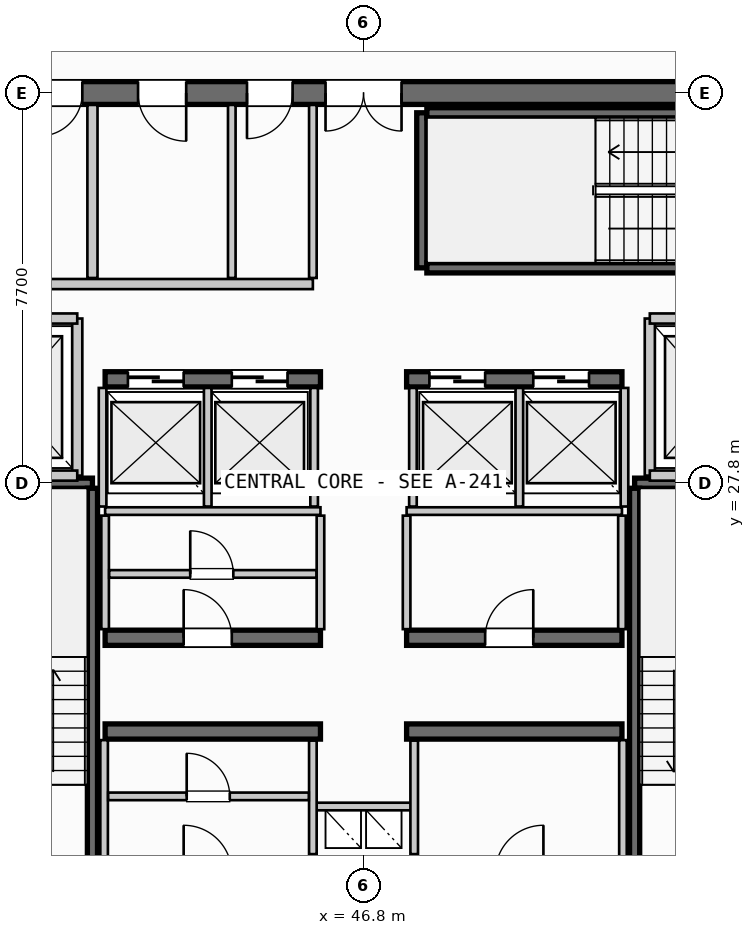
"""IFC4 building model, lengths in metres.
Left out: names, types, materials, properties, quantities, classifications, styles, units other than length and angle.
Written with IfcOpenShell. Run it as: python <this file> out.ifc"""

import sys

from ifc_helpers import new_model, si_unit, direction, frame, frame_2d, origin, place, context, subcontext, project, spatial, rectangle, extrude, source, transform, mapped, element, fill, save


model = new_model("IFC4")
c1 = context("Model", 3, precision=1e-05, world=origin(), true_north=direction((0.0, 1.0)))
c2 = subcontext(c1, "Body", "Model", "MODEL_VIEW")
j1 = project(units=[si_unit("LENGTHUNIT", "METRE"), si_unit("PLANEANGLEUNIT", "RADIAN")], contexts=[c1])
p1 = place(None, origin())
s1 = spatial("IfcSite", under=j1, at=p1, CompositionType="ELEMENT")
p2 = place(p1, origin())
s2 = spatial("IfcBuilding", under=s1, at=p2, CompositionType="ELEMENT")
p3 = place(p2, frame((0.0, 0.0, 297.4)))
s3 = spatial("IfcBuildingStorey", under=s2, at=p3, CompositionType="ELEMENT", Elevation=297.4)
p4 = place(p3, frame((55.6, 35.5, 0.0), z_axis=(0.0, 0.0, 1.0), x_axis=(-1.0, 0.0, 0.0)))
e1 = element("IfcWall", 1, at=p4, inside=s3, PredefinedType="SHEAR", context=c2, shape_type="SweptSolid", body=[
    extrude(rectangle(XDim=17.6, YDim=0.45, at=frame_2d((8.8, 0.0))), origin(), (0.0, 0.0, 1.0), 3.21),
])
p5 = place(p4, frame((8.05, 0.0, 0.0)))
e2 = element("IfcOpeningElement", 2, at=p5, cuts=e1, PredefinedType="OPENING", context=c2, shape_type="SweptSolid", body=[
    extrude(rectangle(XDim=1.5, YDim=2.2, at=frame_2d((0.75, 1.1))), frame((0.0, 0.235, 0.0), z_axis=(0.0, -1.0, 0.0), x_axis=(1.0, 0.0, 0.0)), (0.0, 0.0, 1.0), 0.47),
])
p6 = place(p4, frame((15.85, 0.0, 0.0)))
e3 = element("IfcOpeningElement", 3, at=p6, cuts=e1, PredefinedType="OPENING", context=c2, shape_type="SweptSolid", body=[
    extrude(rectangle(XDim=0.85, YDim=2.15, at=frame_2d((0.425, 1.075))), frame((0.0, 0.235, 0.0), z_axis=(0.0, -1.0, 0.0), x_axis=(1.0, 0.0, 0.0)), (0.0, 0.0, 1.0), 0.47),
])
p7 = place(p4, frame((14.35, 0.0, 0.0)))
e4 = element("IfcOpeningElement", 4, at=p7, cuts=e1, PredefinedType="OPENING", context=c2, shape_type="SweptSolid", body=[
    extrude(rectangle(XDim=0.85, YDim=2.15, at=frame_2d((0.425, 1.075))), frame((0.0, 0.235, 0.0), z_axis=(0.0, -1.0, 0.0), x_axis=(1.0, 0.0, 0.0)), (0.0, 0.0, 1.0), 0.47),
])
p8 = place(p4, frame((12.3, 0.0, 0.0)))
e5 = element("IfcOpeningElement", 5, at=p8, cuts=e1, PredefinedType="OPENING", context=c2, shape_type="SweptSolid", body=[
    extrude(rectangle(XDim=0.95, YDim=2.15, at=frame_2d((0.475, 1.075))), frame((0.0, 0.235, 0.0), z_axis=(0.0, -1.0, 0.0), x_axis=(1.0, 0.0, 0.0)), (0.0, 0.0, 1.0), 0.47),
])
p9 = place(p4, frame((10.2, 0.0, 0.0)))
e6 = element("IfcOpeningElement", 6, at=p9, cuts=e1, PredefinedType="OPENING", context=c2, shape_type="SweptSolid", body=[
    extrude(rectangle(XDim=0.9, YDim=2.15, at=frame_2d((0.45, 1.075))), frame((0.0, 0.235, 0.0), z_axis=(0.0, -1.0, 0.0), x_axis=(1.0, 0.0, 0.0)), (0.0, 0.0, 1.0), 0.47),
])
for number, where, z_axis, x_axis in (
    (7, (41.7, 22.9, 0.0), (0.0, 0.0, 1.0), (1.0, 0.0, 0.0)),
    (8, (47.65, 22.9, 0.0), (0.0, 0.0, 1.0), (1.0, 0.0, 0.0)),
):
    element("IfcWall", number, at=place(p3, frame(where, z_axis=z_axis, x_axis=x_axis)), inside=s3, PredefinedType="SHEAR", context=c2, shape_type="SweptSolid", body=[
        extrude(rectangle(XDim=4.25, YDim=0.3, at=frame_2d((2.125, 0.0))), origin(), (0.0, 0.0, 1.0), 3.21),
    ])
p10 = place(p3, frame((41.7, 24.75, 0.0), z_axis=(0.0, 0.0, 1.0), x_axis=(1.0, 0.0, 0.0)))
e9 = element("IfcWall", 9, at=p10, inside=s3, PredefinedType="SHEAR", context=c2, shape_type="SweptSolid", body=[
    extrude(rectangle(XDim=4.25, YDim=0.3, at=frame_2d((2.125, 0.0))), origin(), (0.0, 0.0, 1.0), 3.21),
])
p11 = place(p10, frame((1.55, 0.0, 0.0)))
e10 = element("IfcOpeningElement", 10, at=p11, cuts=e9, PredefinedType="OPENING", context=c2, shape_type="SweptSolid", body=[
    extrude(rectangle(XDim=0.95, YDim=2.15, at=frame_2d((0.475, 1.075))), frame((0.0, 0.16, 0.0), z_axis=(0.0, -1.0, 0.0), x_axis=(1.0, 0.0, 0.0)), (0.0, 0.0, 1.0), 0.32),
])
p12 = place(p3, frame((47.65, 24.75, 0.0), z_axis=(0.0, 0.0, 1.0), x_axis=(1.0, 0.0, 0.0)))
e11 = element("IfcWall", 11, at=p12, inside=s3, PredefinedType="SHEAR", context=c2, shape_type="SweptSolid", body=[
    extrude(rectangle(XDim=4.25, YDim=0.3, at=frame_2d((2.125, 0.0))), origin(), (0.0, 0.0, 1.0), 3.21),
])
p13 = place(p12, frame((1.55, 0.0, 0.0)))
e12 = element("IfcOpeningElement", 12, at=p13, cuts=e11, PredefinedType="OPENING", context=c2, shape_type="SweptSolid", body=[
    extrude(rectangle(XDim=0.95, YDim=2.15, at=frame_2d((0.475, 1.075))), frame((0.0, 0.16, 0.0), z_axis=(0.0, -1.0, 0.0), x_axis=(1.0, 0.0, 0.0)), (0.0, 0.0, 1.0), 0.32),
])
p14 = place(p3, frame((41.7, 29.85, 0.0), z_axis=(0.0, 0.0, 1.0), x_axis=(1.0, 0.0, 0.0)))
e13 = element("IfcWall", 13, at=p14, inside=s3, PredefinedType="SHEAR", context=c2, shape_type="SweptSolid", body=[
    extrude(rectangle(XDim=4.25, YDim=0.3, at=frame_2d((2.125, 0.0))), origin(), (0.0, 0.0, 1.0), 3.21),
])
p15 = place(p14, frame((0.45, 0.0, 0.0)))
e14 = element("IfcOpeningElement", 14, at=p15, cuts=e13, PredefinedType="OPENING", context=c2, shape_type="SweptSolid", body=[
    extrude(rectangle(XDim=1.1, YDim=2.2, at=frame_2d((0.55, 1.1))), frame((0.0, 0.16, 0.0), z_axis=(0.0, -1.0, 0.0), x_axis=(1.0, 0.0, 0.0)), (0.0, 0.0, 1.0), 0.32),
])
p16 = place(p14, frame((2.5, 0.0, 0.0)))
e15 = element("IfcOpeningElement", 15, at=p16, cuts=e13, PredefinedType="OPENING", context=c2, shape_type="SweptSolid", body=[
    extrude(rectangle(XDim=1.1, YDim=2.2, at=frame_2d((0.55, 1.1))), frame((0.0, 0.16, 0.0), z_axis=(0.0, -1.0, 0.0), x_axis=(1.0, 0.0, 0.0)), (0.0, 0.0, 1.0), 0.32),
])
p17 = place(p3, frame((47.65, 29.85, 0.0), z_axis=(0.0, 0.0, 1.0), x_axis=(1.0, 0.0, 0.0)))
e16 = element("IfcWall", 16, at=p17, inside=s3, PredefinedType="SHEAR", context=c2, shape_type="SweptSolid", body=[
    extrude(rectangle(XDim=4.25, YDim=0.3, at=frame_2d((2.125, 0.0))), origin(), (0.0, 0.0, 1.0), 3.21),
])
p18 = place(p17, frame((0.45, 0.0, 0.0)))
e17 = element("IfcOpeningElement", 17, at=p18, cuts=e16, PredefinedType="OPENING", context=c2, shape_type="SweptSolid", body=[
    extrude(rectangle(XDim=1.1, YDim=2.2, at=frame_2d((0.55, 1.1))), frame((0.0, 0.16, 0.0), z_axis=(0.0, -1.0, 0.0), x_axis=(1.0, 0.0, 0.0)), (0.0, 0.0, 1.0), 0.32),
])
p19 = place(p17, frame((2.5, 0.0, 0.0)))
e18 = element("IfcOpeningElement", 18, at=p19, cuts=e16, PredefinedType="OPENING", context=c2, shape_type="SweptSolid", body=[
    extrude(rectangle(XDim=1.1, YDim=2.2, at=frame_2d((0.55, 1.1))), frame((0.0, 0.16, 0.0), z_axis=(0.0, -1.0, 0.0), x_axis=(1.0, 0.0, 0.0)), (0.0, 0.0, 1.0), 0.32),
])
p20 = place(p3, frame((38.39, 27.8, 0.0), z_axis=(0.0, 0.0, 1.0), x_axis=(1.0, 0.0, 0.0)))
e19 = element("IfcWall", 19, at=p20, inside=s3, PredefinedType="SHEAR", context=c2, shape_type="SweptSolid", body=[
    extrude(rectangle(XDim=3.06, YDim=0.2, at=frame_2d((1.53, 0.0))), origin(), (0.0, 0.0, 1.0), 3.21),
])
p21 = place(p3, frame((41.45, 27.7, 0.0), z_axis=(0.0, 0.0, 1.0), x_axis=(0.0, -1.0, 0.0)))
e20 = element("IfcWall", 20, at=p21, inside=s3, PredefinedType="SHEAR", context=c2, shape_type="SweptSolid", body=[
    extrude(rectangle(XDim=7.35, YDim=0.2, at=frame_2d((3.675, 0.0))), origin(), (0.0, 0.0, 1.0), 3.21),
])
p22 = place(p3, frame((52.15, 27.8, 0.0), z_axis=(0.0, 0.0, 1.0), x_axis=(1.0, 0.0, 0.0)))
e21 = element("IfcWall", 21, at=p22, inside=s3, PredefinedType="SHEAR", context=c2, shape_type="SweptSolid", body=[
    extrude(rectangle(XDim=3.06, YDim=0.2, at=frame_2d((1.53, 0.0))), origin(), (0.0, 0.0, 1.0), 3.21),
])
p23 = place(p3, frame((52.15, 20.35, 0.0), z_axis=(0.0, 0.0, 1.0), x_axis=(0.0, 1.0, 0.0)))
e22 = element("IfcWall", 22, at=p23, inside=s3, PredefinedType="SHEAR", context=c2, shape_type="SweptSolid", body=[
    extrude(rectangle(XDim=7.35, YDim=0.2, at=frame_2d((3.675, 0.0))), origin(), (0.0, 0.0, 1.0), 3.21),
])
p24 = place(p3, frame((47.95, 32.05, 0.0), z_axis=(0.0, 0.0, 1.0), x_axis=(0.0, 1.0, 0.0)))
e23 = element("IfcWall", 23, at=p24, inside=s3, PredefinedType="SHEAR", context=c2, shape_type="SweptSolid", body=[
    extrude(rectangle(XDim=3.06, YDim=0.2, at=frame_2d((1.53, 0.0))), origin(), (0.0, 0.0, 1.0), 3.21),
])
for number, where, z_axis, x_axis in (
    (24, (48.05, 35.11, 0.0), (0.0, 0.0, 1.0), (1.0, 0.0, 0.0)),
    (25, (55.4, 32.05, 0.0), (0.0, 0.0, 1.0), (-1.0, 0.0, 0.0)),
):
    element("IfcWall", number, at=place(p3, frame(where, z_axis=z_axis, x_axis=x_axis)), inside=s3, PredefinedType="SHEAR", context=c2, shape_type="SweptSolid", body=[
        extrude(rectangle(XDim=7.35, YDim=0.2, at=frame_2d((3.675, 0.0))), origin(), (0.0, 0.0, 1.0), 3.21),
    ])
p25 = place(p3, frame((45.8, 21.42, 0.0), z_axis=(0.0, 0.0, 1.0), x_axis=(1.0, 0.0, 0.0)))
e26 = element("IfcWall", 26, at=p25, inside=s3, PredefinedType="PARTITIONING", context=c2, shape_type="SweptSolid", body=[
    extrude(rectangle(XDim=2.0, YDim=0.15, at=frame_2d((1.0, 0.0))), origin(), (0.0, 0.0, 1.0), 2.28),
])
for number, where, z_axis, x_axis in (
    (27, (45.8, 20.48, 0.0), (0.0, 0.0, 1.0), (0.0, 1.0, 0.0)),
    (28, (47.8, 20.48, 0.0), (0.0, 0.0, 1.0), (0.0, 1.0, 0.0)),
):
    element("IfcWall", number, at=place(p3, frame(where, z_axis=z_axis, x_axis=x_axis)), inside=s3, PredefinedType="PARTITIONING", context=c2, shape_type="SweptSolid", body=[
        extrude(rectangle(XDim=2.24, YDim=0.15, at=frame_2d((1.12, 0.0))), origin(), (0.0, 0.0, 1.0), 2.28),
    ])
p26 = place(p3, frame((41.15, 27.95, 0.0), z_axis=(0.0, 0.0, 1.0), x_axis=(0.0, 1.0, 0.0)))
e29 = element("IfcWall", 29, at=p26, inside=s3, PredefinedType="PARTITIONING", context=c2, shape_type="SweptSolid", body=[
    extrude(rectangle(XDim=3.1, YDim=0.2, at=frame_2d((1.55, 0.0))), origin(), (0.0, 0.0, 1.0), 2.28),
])
for number, where, z_axis, x_axis in (
    (30, (38.235, 27.95, 0.0), (0.0, 0.0, 1.0), (1.0, 0.0, 0.0)),
    (31, (38.235, 31.05, 0.0), (0.0, 0.0, 1.0), (1.0, 0.0, 0.0)),
):
    element("IfcWall", number, at=place(p3, frame(where, z_axis=z_axis, x_axis=x_axis)), inside=s3, PredefinedType="PARTITIONING", context=c2, shape_type="SweptSolid", body=[
        extrude(rectangle(XDim=2.915, YDim=0.2, at=frame_2d((1.458, 0.0))), origin(), (0.0, 0.0, 1.0), 2.28),
    ])
p27 = place(p3, frame((52.45, 27.95, 0.0), z_axis=(0.0, 0.0, 1.0), x_axis=(0.0, 1.0, 0.0)))
e32 = element("IfcWall", 32, at=p27, inside=s3, PredefinedType="PARTITIONING", context=c2, shape_type="SweptSolid", body=[
    extrude(rectangle(XDim=3.1, YDim=0.2, at=frame_2d((1.55, 0.0))), origin(), (0.0, 0.0, 1.0), 2.28),
])
for number, where, z_axis, x_axis in (
    (33, (52.45, 27.95, 0.0), (0.0, 0.0, 1.0), (1.0, 0.0, 0.0)),
    (34, (52.45, 31.05, 0.0), (0.0, 0.0, 1.0), (1.0, 0.0, 0.0)),
):
    element("IfcWall", number, at=place(p3, frame(where, z_axis=z_axis, x_axis=x_axis)), inside=s3, PredefinedType="PARTITIONING", context=c2, shape_type="SweptSolid", body=[
        extrude(rectangle(XDim=2.915, YDim=0.2, at=frame_2d((1.458, 0.0))), origin(), (0.0, 0.0, 1.0), 2.28),
    ])
for number, where, z_axis, x_axis in (
    (35, (41.68, 20.335, 0.0), (0.0, 0.0, 1.0), (0.0, 1.0, 0.0)),
    (36, (51.92, 20.335, 0.0), (0.0, 0.0, 1.0), (0.0, 1.0, 0.0)),
):
    element("IfcWall", number, at=place(p3, frame(where, z_axis=z_axis, x_axis=x_axis)), inside=s3, PredefinedType="PARTITIONING", context=c2, shape_type="SweptSolid", body=[
        extrude(rectangle(XDim=2.395, YDim=0.15, at=frame_2d((1.198, 0.0))), origin(), (0.0, 0.0, 1.0), 2.28),
    ])
p28 = place(p3, frame((41.76, 21.62, 0.0), z_axis=(0.0, 0.0, 1.0), x_axis=(1.0, 0.0, 0.0)))
e37 = element("IfcWall", 37, at=p28, inside=s3, PredefinedType="PARTITIONING", context=c2, shape_type="SweptSolid", body=[
    extrude(rectangle(XDim=3.96, YDim=0.15, at=frame_2d((1.98, 0.0))), origin(), (0.0, 0.0, 1.0), 2.28),
])
p29 = place(p28, frame((1.55, 0.0, 0.0)))
e38 = element("IfcOpeningElement", 38, at=p29, cuts=e37, PredefinedType="OPENING", context=c2, shape_type="SweptSolid", body=[
    extrude(rectangle(XDim=0.85, YDim=2.15, at=frame_2d((0.425, 1.075))), frame((0.0, 0.085, 0.0), z_axis=(0.0, -1.0, 0.0), x_axis=(1.0, 0.0, 0.0)), (0.0, 0.0, 1.0), 0.17),
])
for number, where, z_axis, x_axis in (
    (39, (41.7, 27.25, 0.0), (0.0, 0.0, 1.0), (1.0, 0.0, 0.0)),
    (40, (47.65, 27.25, 0.0), (0.0, 0.0, 1.0), (1.0, 0.0, 0.0)),
):
    element("IfcWall", number, at=place(p3, frame(where, z_axis=z_axis, x_axis=x_axis)), inside=s3, PredefinedType="PARTITIONING", context=c2, shape_type="SweptSolid", body=[
        extrude(rectangle(XDim=4.25, YDim=0.15, at=frame_2d((2.125, 0.0))), origin(), (0.0, 0.0, 1.0), 2.28),
    ])
for number, where, z_axis, x_axis in (
    (41, (41.7, 24.92, 0.0), (0.0, 0.0, 1.0), (0.0, 1.0, 0.0)),
    (42, (45.95, 24.92, 0.0), (0.0, 0.0, 1.0), (0.0, 1.0, 0.0)),
    (43, (47.65, 24.92, 0.0), (0.0, 0.0, 1.0), (0.0, 1.0, 0.0)),
    (44, (51.9, 24.92, 0.0), (0.0, 0.0, 1.0), (0.0, 1.0, 0.0)),
):
    element("IfcWall", number, at=place(p3, frame(where, z_axis=z_axis, x_axis=x_axis)), inside=s3, PredefinedType="PARTITIONING", context=c2, shape_type="SweptSolid", body=[
        extrude(rectangle(XDim=2.24, YDim=0.15, at=frame_2d((1.12, 0.0))), origin(), (0.0, 0.0, 1.0), 2.28),
    ])
p30 = place(p3, frame((41.78, 26.01, 0.0), z_axis=(0.0, 0.0, 1.0), x_axis=(1.0, 0.0, 0.0)))
e45 = element("IfcWall", 45, at=p30, inside=s3, PredefinedType="PARTITIONING", context=c2, shape_type="SweptSolid", body=[
    extrude(rectangle(XDim=4.09, YDim=0.15, at=frame_2d((2.045, 0.0))), origin(), (0.0, 0.0, 1.0), 2.28),
])
p31 = place(p30, frame((1.6, 0.0, 0.0)))
e46 = element("IfcOpeningElement", 46, at=p31, cuts=e45, PredefinedType="OPENING", context=c2, shape_type="SweptSolid", body=[
    extrude(rectangle(XDim=0.85, YDim=2.15, at=frame_2d((0.425, 1.075))), frame((0.0, 0.085, 0.0), z_axis=(0.0, -1.0, 0.0), x_axis=(1.0, 0.0, 0.0)), (0.0, 0.0, 1.0), 0.17),
])
for number, where, z_axis, x_axis in (
    (47, (41.65, 27.34, 0.0), (0.0, 0.0, 1.0), (0.0, 1.0, 0.0)),
    (48, (43.725, 27.34, 0.0), (0.0, 0.0, 1.0), (0.0, 1.0, 0.0)),
    (49, (45.825, 27.34, 0.0), (0.0, 0.0, 1.0), (0.0, 1.0, 0.0)),
    (50, (47.775, 27.34, 0.0), (0.0, 0.0, 1.0), (0.0, 1.0, 0.0)),
    (51, (49.875, 27.34, 0.0), (0.0, 0.0, 1.0), (0.0, 1.0, 0.0)),
    (52, (51.95, 27.34, 0.0), (0.0, 0.0, 1.0), (0.0, 1.0, 0.0)),
):
    element("IfcWall", number, at=place(p3, frame(where, z_axis=z_axis, x_axis=x_axis)), inside=s3, PredefinedType="PARTITIONING", context=c2, shape_type="SweptSolid", body=[
        extrude(rectangle(XDim=2.34, YDim=0.15, at=frame_2d((1.17, 0.0))), origin(), (0.0, 0.0, 1.0), 2.28),
    ])
p32 = place(p3, frame((41.45, 31.85, 0.0), z_axis=(0.0, 0.0, 1.0), x_axis=(0.0, 1.0, 0.0)))
e53 = element("IfcWall", 53, at=p32, inside=s3, PredefinedType="PARTITIONING", context=c2, shape_type="SweptSolid", body=[
    extrude(rectangle(XDim=3.415, YDim=0.2, at=frame_2d((1.708, 0.0))), origin(), (0.0, 0.0, 1.0), 2.28),
])
p33 = place(p3, frame((38.235, 31.73, 0.0), z_axis=(0.0, 0.0, 1.0), x_axis=(1.0, 0.0, 0.0)))
e54 = element("IfcWall", 54, at=p33, inside=s3, PredefinedType="PARTITIONING", context=c2, shape_type="SweptSolid", body=[
    extrude(rectangle(XDim=7.565, YDim=0.2, at=frame_2d((3.782, 0.0))), origin(), (0.0, 0.0, 1.0), 2.28),
])
p34 = place(p3, frame((45.8, 31.85, 0.0), z_axis=(0.0, 0.0, 1.0), x_axis=(0.0, 1.0, 0.0)))
e55 = element("IfcWall", 55, at=p34, inside=s3, PredefinedType="PARTITIONING", context=c2, shape_type="SweptSolid", body=[
    extrude(rectangle(XDim=3.415, YDim=0.15, at=frame_2d((1.708, 0.0))), origin(), (0.0, 0.0, 1.0), 2.28),
])
p35 = place(p3, frame((44.2, 31.85, 0.0), z_axis=(0.0, 0.0, 1.0), x_axis=(0.0, 1.0, 0.0)))
e56 = element("IfcWall", 56, at=p35, inside=s3, PredefinedType="PLUMBINGWALL", context=c2, shape_type="SweptSolid", body=[
    extrude(rectangle(XDim=3.415, YDim=0.15, at=frame_2d((1.708, 0.0))), origin(), (0.0, 0.0, 1.0), 2.28),
])
m1 = source(origin(), c2, "Body", "SweptSolid", [
    extrude(rectangle(XDim=1.5, YDim=2.2, at=frame_2d((0.75, 1.1))), frame((0.0, 0.025, 0.0), z_axis=(0.0, -1.0, 0.0), x_axis=(1.0, 0.0, 0.0)), (0.0, 0.0, 1.0), 0.05),
])
p36 = place(p5, origin())
e57 = element("IfcDoor", 57, at=p36, inside=s3, OperationType="DOUBLE_DOOR_SINGLE_SWING", PredefinedType="DOOR", context=c2, shape_type="MappedRepresentation", body=[
    mapped(m1, transform((0.0, 0.0, 0.0), scale=1.0)),
])
fill(e2, e57)
m2 = source(origin(), c2, "Body", "SweptSolid", [
    extrude(rectangle(XDim=0.95, YDim=2.15, at=frame_2d((0.475, 1.075))), frame((0.0, 0.025, 0.0), z_axis=(0.0, -1.0, 0.0), x_axis=(1.0, 0.0, 0.0)), (0.0, 0.0, 1.0), 0.05),
])
p37 = place(p11, origin())
e58 = element("IfcDoor", 58, at=p37, inside=s3, OperationType="SINGLE_SWING_LEFT", PredefinedType="DOOR", context=c2, shape_type="MappedRepresentation", body=[
    mapped(m2, transform((0.0, 0.0, 0.0), scale=1.0)),
])
fill(e10, e58)
p38 = place(p13, origin())
e59 = element("IfcDoor", 59, at=p38, inside=s3, OperationType="SINGLE_SWING_RIGHT", PredefinedType="DOOR", context=c2, shape_type="MappedRepresentation", body=[
    mapped(m2, transform((0.0, 0.0, 0.0), scale=1.0)),
])
fill(e12, e59)
m3 = source(origin(), c2, "Body", "SweptSolid", [
    extrude(rectangle(XDim=1.1, YDim=2.2, at=frame_2d((0.55, 1.1))), frame((0.0, 0.025, 0.0), z_axis=(0.0, -1.0, 0.0), x_axis=(1.0, 0.0, 0.0)), (0.0, 0.0, 1.0), 0.05),
])
p39 = place(p15, origin())
e60 = element("IfcDoor", 60, at=p39, inside=s3, OperationType="SLIDING_TO_LEFT", PredefinedType="DOOR", context=c2, shape_type="MappedRepresentation", body=[
    mapped(m3, transform((0.0, 0.0, 0.0), scale=1.0)),
])
fill(e14, e60)
p40 = place(p16, origin())
e61 = element("IfcDoor", 61, at=p40, inside=s3, OperationType="SLIDING_TO_LEFT", PredefinedType="DOOR", context=c2, shape_type="MappedRepresentation", body=[
    mapped(m3, transform((0.0, 0.0, 0.0), scale=1.0)),
])
fill(e15, e61)
p41 = place(p18, origin())
e62 = element("IfcDoor", 62, at=p41, inside=s3, OperationType="SLIDING_TO_LEFT", PredefinedType="DOOR", context=c2, shape_type="MappedRepresentation", body=[
    mapped(m3, transform((0.0, 0.0, 0.0), scale=1.0)),
])
fill(e17, e62)
p42 = place(p19, origin())
e63 = element("IfcDoor", 63, at=p42, inside=s3, OperationType="SLIDING_TO_LEFT", PredefinedType="DOOR", context=c2, shape_type="MappedRepresentation", body=[
    mapped(m3, transform((0.0, 0.0, 0.0), scale=1.0)),
])
fill(e18, e63)
m4 = source(origin(), c2, "Body", "SweptSolid", [
    extrude(rectangle(XDim=0.85, YDim=2.15, at=frame_2d((0.425, 1.075))), frame((0.0, 0.025, 0.0), z_axis=(0.0, -1.0, 0.0), x_axis=(1.0, 0.0, 0.0)), (0.0, 0.0, 1.0), 0.05),
])
p43 = place(p7, origin())
e64 = element("IfcDoor", 64, at=p43, inside=s3, OperationType="SINGLE_SWING_RIGHT", PredefinedType="DOOR", context=c2, shape_type="MappedRepresentation", body=[
    mapped(m4, transform((0.0, 0.0, 0.0), scale=1.0)),
])
fill(e4, e64)
p44 = place(p8, origin())
e65 = element("IfcDoor", 65, at=p44, inside=s3, OperationType="SINGLE_SWING_LEFT", PredefinedType="DOOR", context=c2, shape_type="MappedRepresentation", body=[
    mapped(m2, transform((0.0, 0.0, 0.0), scale=1.0)),
])
fill(e5, e65)
m5 = source(origin(), c2, "Body", "SweptSolid", [
    extrude(rectangle(XDim=0.9, YDim=2.15, at=frame_2d((0.45, 1.075))), frame((0.0, 0.025, 0.0), z_axis=(0.0, -1.0, 0.0), x_axis=(1.0, 0.0, 0.0)), (0.0, 0.0, 1.0), 0.05),
])
p45 = place(p9, origin())
e66 = element("IfcDoor", 66, at=p45, inside=s3, OperationType="SINGLE_SWING_RIGHT", PredefinedType="DOOR", context=c2, shape_type="MappedRepresentation", body=[
    mapped(m5, transform((0.0, 0.0, 0.0), scale=1.0)),
])
fill(e6, e66)
p46 = place(p29, origin())
e67 = element("IfcDoor", 67, at=p46, inside=s3, OperationType="SINGLE_SWING_LEFT", PredefinedType="DOOR", context=c2, shape_type="MappedRepresentation", body=[
    mapped(m4, transform((0.0, 0.0, 0.0), scale=1.0)),
])
fill(e38, e67)
p47 = place(p31, origin())
e68 = element("IfcDoor", 68, at=p47, inside=s3, OperationType="SINGLE_SWING_LEFT", PredefinedType="DOOR", context=c2, shape_type="MappedRepresentation", body=[
    mapped(m4, transform((0.0, 0.0, 0.0), scale=1.0)),
])
fill(e46, e68)
save(model, sys.argv[1])
